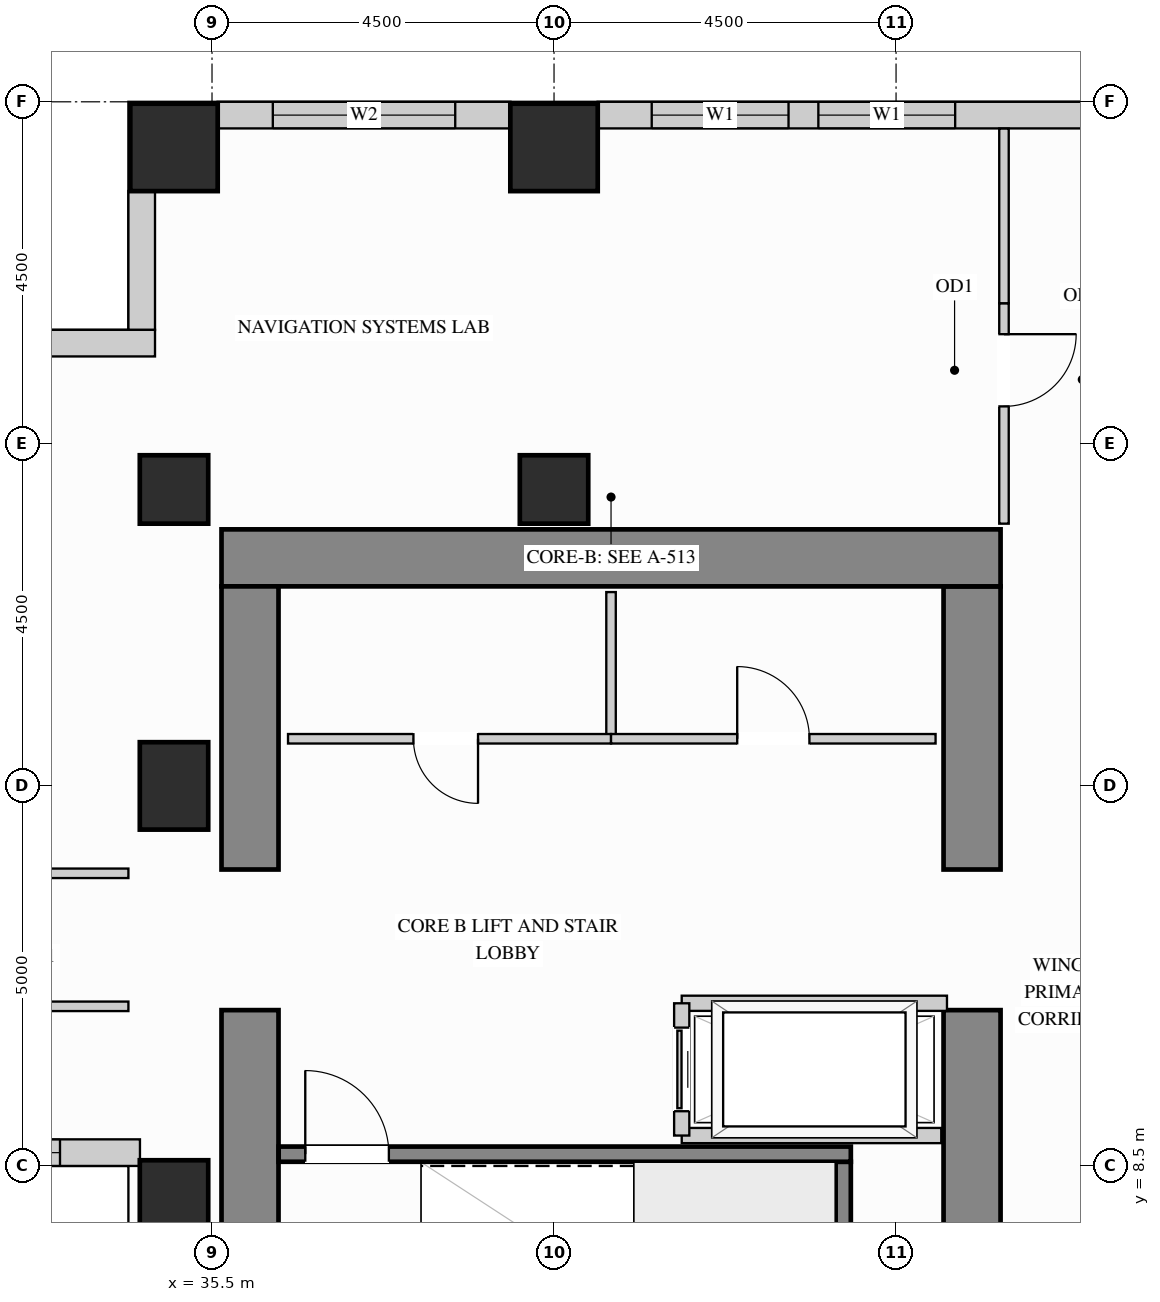
"""IFC4 building model, lengths in metres.
Left out: names, types, materials, properties, quantities, classifications, styles, units other than length and angle.
Written with IfcOpenShell. Run it as: python <this file> out.ifc"""

import sys

from ifc_helpers import new_model, si_unit, direction, frame, frame_2d, origin, origin_2d, place, context, subcontext, project, spatial, rectangle, extrude, source, transform, mapped, element, fill, save


model = new_model("IFC4")
c1 = context("Model", 3, precision=1e-05, world=origin(), true_north=direction((0.0, 1.0)))
c2 = subcontext(c1, "Body", "Model", "MODEL_VIEW")
j1 = project(units=[si_unit("LENGTHUNIT", "METRE"), si_unit("PLANEANGLEUNIT", "RADIAN")], contexts=[c1])
p1 = place(None, origin())
s1 = spatial("IfcSite", under=j1, at=p1, CompositionType="ELEMENT")
p2 = place(p1, origin())
s2 = spatial("IfcBuilding", under=s1, at=p2, CompositionType="ELEMENT")
p3 = place(p2, frame((0.0, 0.0, 127.8)))
s3 = spatial("IfcBuildingStorey", under=s2, at=p3, CompositionType="ELEMENT", Elevation=127.8)
m1 = source(origin(), c2, "Body", "SweptSolid", [
    extrude(rectangle(XDim=0.9, YDim=0.9, at=origin_2d()), origin(), (0.0, 0.0, 1.0), 3.38),
])
for number, where, z_axis, x_axis in (
    (1, (35.0, 17.4, 0.0), (0.0, 0.0, 1.0), (1.0, 0.0, 0.0)),
    (2, (40.0, 17.4, 0.0), (0.0, 0.0, 1.0), (1.0, 0.0, 0.0)),
):
    element("IfcColumn", number, at=place(p3, frame(where, z_axis=z_axis, x_axis=x_axis)), inside=s3, PredefinedType="COLUMN", context=c2, shape_type="MappedRepresentation", body=[
        mapped(m1, transform((0.0, 0.0, 0.0), x_axis=(1.0, 0.0, 0.0), y_axis=(0.0, 1.0, 0.0), z_axis=(0.0, 0.0, 1.0))),
    ])
m2 = source(origin(), c2, "Body", "SweptSolid", [
    extrude(rectangle(XDim=0.9, YDim=1.15, at=origin_2d()), origin(), (0.0, 0.0, 1.0), 3.38),
])
for number, where, z_axis, x_axis in (
    (3, (35.0, 13.5, 0.0), (0.0, 0.0, 1.0), (1.0, 0.0, 0.0)),
    (4, (35.0, 8.0, 0.0), (0.0, 0.0, 1.0), (1.0, 0.0, 0.0)),
):
    element("IfcColumn", number, at=place(p3, frame(where, z_axis=z_axis, x_axis=x_axis)), inside=s3, PredefinedType="COLUMN", context=c2, shape_type="MappedRepresentation", body=[
        mapped(m2, transform((0.0, 0.0, 0.0), x_axis=(1.0, 0.0, 0.0), y_axis=(0.0, 1.0, 0.0), z_axis=(0.0, 0.0, 1.0))),
    ])
m3 = source(origin(), c2, "Body", "SweptSolid", [
    extrude(rectangle(XDim=1.15, YDim=1.15, at=origin_2d()), origin(), (0.0, 0.0, 1.0), 3.38),
])
for number, where, z_axis, x_axis in (
    (5, (35.0, 21.9, 0.0), (0.0, 0.0, 1.0), (1.0, 0.0, 0.0)),
    (6, (40.0, 21.9, 0.0), (0.0, 0.0, 1.0), (1.0, 0.0, 0.0)),
):
    element("IfcColumn", number, at=place(p3, frame(where, z_axis=z_axis, x_axis=x_axis)), inside=s3, PredefinedType="COLUMN", context=c2, shape_type="MappedRepresentation", body=[
        mapped(m3, transform((0.0, 0.0, 0.0), x_axis=(1.0, 0.0, 0.0), y_axis=(0.0, 1.0, 0.0), z_axis=(0.0, 0.0, 1.0))),
    ])
m4 = source(origin(), c2, "Body", "SweptSolid", [
    extrude(rectangle(XDim=5.675, YDim=0.75, at=frame_2d((2.837, 0.0))), origin(), (0.0, 0.0, 1.0), 3.38),
])
p4 = place(p3, frame((45.5, 4.875, 0.0), z_axis=(0.0, 0.0, 1.0), x_axis=(0.0, 1.0, 0.0)))
e7 = element("IfcWall", 7, at=p4, inside=s3, PredefinedType="SHEAR", context=c2, shape_type="MappedRepresentation", body=[
    mapped(m4, transform((0.0, 0.0, 0.0), x_axis=(1.0, 0.0, 0.0), y_axis=(0.0, 1.0, 0.0), z_axis=(0.0, 0.0, 1.0))),
])
m5 = source(origin(), c2, "Body", "SweptSolid", [
    extrude(rectangle(XDim=3.725, YDim=0.75, at=frame_2d((1.863, 0.0))), origin(), (0.0, 0.0, 1.0), 3.38),
])
p5 = place(p3, frame((45.5, 12.4, 0.0), z_axis=(0.0, 0.0, 1.0), x_axis=(0.0, 1.0, 0.0)))
e8 = element("IfcWall", 8, at=p5, inside=s3, PredefinedType="SHEAR", context=c2, shape_type="MappedRepresentation", body=[
    mapped(m5, transform((0.0, 0.0, 0.0), x_axis=(1.0, 0.0, 0.0), y_axis=(0.0, 1.0, 0.0), z_axis=(0.0, 0.0, 1.0))),
])
m6 = source(origin(), c2, "Body", "SweptSolid", [
    extrude(rectangle(XDim=10.25, YDim=0.75, at=frame_2d((5.125, 0.0))), origin(), (0.0, 0.0, 1.0), 3.38),
])
p6 = place(p3, frame((35.625, 16.5, 0.0), z_axis=(0.0, 0.0, 1.0), x_axis=(1.0, 0.0, 0.0)))
e9 = element("IfcWall", 9, at=p6, inside=s3, PredefinedType="SHEAR", context=c2, shape_type="MappedRepresentation", body=[
    mapped(m6, transform((0.0, 0.0, 0.0), x_axis=(1.0, 0.0, 0.0), y_axis=(0.0, 1.0, 0.0), z_axis=(0.0, 0.0, 1.0))),
])
p7 = place(p3, frame((36.0, 4.875, 0.0), z_axis=(0.0, 0.0, 1.0), x_axis=(0.0, 1.0, 0.0)))
e10 = element("IfcWall", 10, at=p7, inside=s3, PredefinedType="SHEAR", context=c2, shape_type="MappedRepresentation", body=[
    mapped(m4, transform((0.0, 0.0, 0.0), x_axis=(1.0, 0.0, 0.0), y_axis=(0.0, 1.0, 0.0), z_axis=(0.0, 0.0, 1.0))),
])
p8 = place(p3, frame((36.0, 12.4, 0.0), z_axis=(0.0, 0.0, 1.0), x_axis=(0.0, 1.0, 0.0)))
e11 = element("IfcWall", 11, at=p8, inside=s3, PredefinedType="SHEAR", context=c2, shape_type="MappedRepresentation", body=[
    mapped(m5, transform((0.0, 0.0, 0.0), x_axis=(1.0, 0.0, 0.0), y_axis=(0.0, 1.0, 0.0), z_axis=(0.0, 0.0, 1.0))),
])
p9 = place(p3, frame((30.948, 8.675, 0.0), z_axis=(0.0, 0.0, 1.0), x_axis=(1.0, 0.0, 0.0)))
e12 = element("IfcWall", 12, at=p9, inside=s3, PredefinedType="SOLIDWALL", context=c2, shape_type="SweptSolid", body=[
    extrude(rectangle(XDim=3.604, YDim=0.35, at=frame_2d((1.802, 0.0))), origin(), (0.0, 0.0, 1.0), 3.365),
])
p10 = place(p9, frame((1.052, 0.0, 0.78)))
e13 = element("IfcOpeningElement", 13, at=p10, cuts=e12, PredefinedType="OPENING", context=c2, shape_type="SweptSolid", body=[
    extrude(rectangle(XDim=1.5, YDim=2.0, at=frame_2d((0.75, 1.0))), frame((0.0, 0.185, 0.0), z_axis=(0.0, -1.0, 0.0), x_axis=(1.0, 0.0, 0.0)), (0.0, 0.0, 1.0), 0.37),
])
p11 = place(p3, frame((47.027, 22.325, 0.0), z_axis=(0.0, 0.0, 1.0), x_axis=(-1.0, 0.0, 0.0)))
e14 = element("IfcWall", 14, at=p11, inside=s3, PredefinedType="SOLIDWALL", context=c2, shape_type="SweptSolid", body=[
    extrude(rectangle(XDim=6.454, YDim=0.35, at=frame_2d((3.227, 0.0))), origin(), (0.0, 0.0, 1.0), 3.365),
])
p12 = place(p11, frame((1.749, 0.0, 0.78)))
e15 = element("IfcOpeningElement", 15, at=p12, cuts=e14, PredefinedType="OPENING", context=c2, shape_type="SweptSolid", body=[
    extrude(rectangle(XDim=1.8, YDim=2.1, at=frame_2d((0.9, 1.05))), frame((0.0, 0.185, 0.0), z_axis=(0.0, -1.0, 0.0), x_axis=(1.0, 0.0, 0.0)), (0.0, 0.0, 1.0), 0.37),
])
p13 = place(p11, frame((3.942, 0.0, 0.78)))
e16 = element("IfcOpeningElement", 16, at=p13, cuts=e14, PredefinedType="OPENING", context=c2, shape_type="SweptSolid", body=[
    extrude(rectangle(XDim=1.8, YDim=2.1, at=frame_2d((0.9, 1.05))), frame((0.0, 0.185, 0.0), z_axis=(0.0, -1.0, 0.0), x_axis=(1.0, 0.0, 0.0)), (0.0, 0.0, 1.0), 0.37),
])
p14 = place(p3, frame((39.427, 22.325, 0.0), z_axis=(0.0, 0.0, 1.0), x_axis=(-1.0, 0.0, 0.0)))
e17 = element("IfcWall", 17, at=p14, inside=s3, PredefinedType="SOLIDWALL", context=c2, shape_type="SweptSolid", body=[
    extrude(rectangle(XDim=3.854, YDim=0.35, at=frame_2d((1.927, 0.0))), origin(), (0.0, 0.0, 1.0), 3.365),
])
p15 = place(p14, frame((0.727, 0.0, 0.78)))
e18 = element("IfcOpeningElement", 18, at=p15, cuts=e17, PredefinedType="OPENING", context=c2, shape_type="SweptSolid", body=[
    extrude(rectangle(XDim=2.4, YDim=2.1, at=frame_2d((1.2, 1.05))), frame((0.0, 0.185, 0.0), z_axis=(0.0, -1.0, 0.0), x_axis=(1.0, 0.0, 0.0)), (0.0, 0.0, 1.0), 0.37),
])
m7 = source(origin(), c2, "Body", "SweptSolid", [
    extrude(rectangle(XDim=1.829, YDim=0.35, at=frame_2d((0.915, 0.0))), origin(), (0.0, 0.0, 1.0), 3.365),
])
p16 = place(p3, frame((34.575, 21.327, 0.0), z_axis=(0.0, 0.0, 1.0), x_axis=(0.0, -1.0, 0.0)))
e19 = element("IfcWall", 19, at=p16, inside=s3, PredefinedType="SOLIDWALL", context=c2, shape_type="MappedRepresentation", body=[
    mapped(m7, transform((0.0, 0.0, 0.0), x_axis=(1.0, 0.0, 0.0), y_axis=(0.0, 1.0, 0.0), z_axis=(0.0, 0.0, 1.0))),
])
p17 = place(p3, frame((34.75, 19.325, 0.0), z_axis=(0.0, 0.0, 1.0), x_axis=(-1.0, 0.0, 0.0)))
e20 = element("IfcWall", 20, at=p17, inside=s3, PredefinedType="SOLIDWALL", context=c2, shape_type="SweptSolid", body=[
    extrude(rectangle(XDim=15.6, YDim=0.35, at=frame_2d((7.8, 0.0))), origin(), (0.0, 0.0, 1.0), 3.365),
])
p18 = place(p17, frame((4.307, 0.0, 0.78)))
e21 = element("IfcOpeningElement", 21, at=p18, cuts=e20, PredefinedType="OPENING", context=c2, shape_type="SweptSolid", body=[
    extrude(rectangle(XDim=1.5, YDim=2.0, at=frame_2d((0.75, 1.0))), frame((0.0, 0.185, 0.0), z_axis=(0.0, -1.0, 0.0), x_axis=(1.0, 0.0, 0.0)), (0.0, 0.0, 1.0), 0.37),
])
p19 = place(p17, frame((9.793, 0.0, 0.78)))
e22 = element("IfcOpeningElement", 22, at=p19, cuts=e20, PredefinedType="OPENING", context=c2, shape_type="SweptSolid", body=[
    extrude(rectangle(XDim=1.5, YDim=2.0, at=frame_2d((0.75, 1.0))), frame((0.0, 0.185, 0.0), z_axis=(0.0, -1.0, 0.0), x_axis=(1.0, 0.0, 0.0)), (0.0, 0.0, 1.0), 0.37),
])
m8 = source(origin(), c2, "Body", "SweptSolid", [
    extrude(rectangle(XDim=1.93, YDim=0.125, at=frame_2d((0.965, 0.0))), origin(), (0.0, 0.0, 1.0), 3.365),
])
p20 = place(p3, frame((40.75, 14.12, 0.0), z_axis=(0.0, 0.0, 1.0), x_axis=(0.0, 1.0, 0.0)))
e23 = element("IfcWall", 23, at=p20, inside=s3, PredefinedType="PARTITIONING", context=c2, shape_type="MappedRepresentation", body=[
    mapped(m8, transform((0.0, 0.0, 0.0), x_axis=(1.0, 0.0, 0.0), y_axis=(0.0, 1.0, 0.0), z_axis=(0.0, 0.0, 1.0))),
])
p21 = place(p3, frame((36.5, 14.12, 0.0), z_axis=(0.0, 0.0, 1.0), x_axis=(1.0, 0.0, 0.0)))
e24 = element("IfcWall", 24, at=p21, inside=s3, PredefinedType="PARTITIONING", context=c2, shape_type="SweptSolid", body=[
    extrude(rectangle(XDim=4.25, YDim=0.125, at=frame_2d((2.125, 0.0))), origin(), (0.0, 0.0, 1.0), 3.365),
])
p22 = place(p21, frame((1.65, 0.0, 0.0)))
e25 = element("IfcOpeningElement", 25, at=p22, cuts=e24, PredefinedType="OPENING", context=c2, shape_type="SweptSolid", body=[
    extrude(rectangle(XDim=0.85, YDim=2.1, at=frame_2d((0.425, 1.05))), frame((0.0, 0.073, 0.0), z_axis=(0.0, -1.0, 0.0), x_axis=(1.0, 0.0, 0.0)), (0.0, 0.0, 1.0), 0.145),
])
p23 = place(p3, frame((40.75, 14.12, 0.0), z_axis=(0.0, 0.0, 1.0), x_axis=(1.0, 0.0, 0.0)))
e26 = element("IfcWall", 26, at=p23, inside=s3, PredefinedType="PARTITIONING", context=c2, shape_type="SweptSolid", body=[
    extrude(rectangle(XDim=4.27, YDim=0.125, at=frame_2d((2.135, 0.0))), origin(), (0.0, 0.0, 1.0), 3.365),
])
p24 = place(p23, frame((1.66, 0.0, 0.0)))
e27 = element("IfcOpeningElement", 27, at=p24, cuts=e26, PredefinedType="OPENING", context=c2, shape_type="SweptSolid", body=[
    extrude(rectangle(XDim=0.95, YDim=2.15, at=frame_2d((0.475, 1.075))), frame((0.0, 0.073, 0.0), z_axis=(0.0, -1.0, 0.0), x_axis=(1.0, 0.0, 0.0)), (0.0, 0.0, 1.0), 0.145),
])
p25 = place(p3, frame((45.92, 16.95, 0.0), z_axis=(0.0, 0.0, 1.0), x_axis=(0.0, 1.0, 0.0)))
e28 = element("IfcWall", 28, at=p25, inside=s3, PredefinedType="PARTITIONING", context=c2, shape_type="SweptSolid", body=[
    extrude(rectangle(XDim=2.9, YDim=0.125, at=frame_2d((1.45, 0.0))), origin(), (0.0, 0.0, 1.0), 3.365),
])
p26 = place(p25, frame((1.543, 0.0, 0.0)))
e29 = element("IfcOpeningElement", 29, at=p26, cuts=e28, PredefinedType="OPENING", context=c2, shape_type="SweptSolid", body=[
    extrude(rectangle(XDim=0.95, YDim=2.15, at=frame_2d((0.475, 1.075))), frame((0.0, 0.073, 0.0), z_axis=(0.0, -1.0, 0.0), x_axis=(1.0, 0.0, 0.0)), (0.0, 0.0, 1.0), 0.145),
])
m9 = source(origin(), c2, "Body", "SweptSolid", [
    extrude(rectangle(XDim=2.298, YDim=0.125, at=frame_2d((1.149, 0.0))), origin(), (0.0, 0.0, 1.0), 3.365),
])
p27 = place(p3, frame((45.92, 19.85, 0.0), z_axis=(0.0, 0.0, 1.0), x_axis=(0.0, 1.0, 0.0)))
e30 = element("IfcWall", 30, at=p27, inside=s3, PredefinedType="PARTITIONING", context=c2, shape_type="MappedRepresentation", body=[
    mapped(m9, transform((0.0, 0.0, 0.0), x_axis=(1.0, 0.0, 0.0), y_axis=(0.0, 1.0, 0.0), z_axis=(0.0, 0.0, 1.0))),
])
p28 = place(p3, frame((29.85, 12.35, 0.0), z_axis=(0.0, 0.0, 1.0), x_axis=(1.0, 0.0, 0.0)))
e31 = element("IfcWall", 31, at=p28, inside=s3, PredefinedType="PARTITIONING", context=c2, shape_type="SweptSolid", body=[
    extrude(rectangle(XDim=4.55, YDim=0.125, at=frame_2d((2.275, 0.0))), origin(), (0.0, 0.0, 1.0), 3.365),
])
p29 = place(p28, frame((1.8, 0.0, 0.0)))
e32 = element("IfcOpeningElement", 32, at=p29, cuts=e31, PredefinedType="OPENING", context=c2, shape_type="SweptSolid", body=[
    extrude(rectangle(XDim=0.95, YDim=2.15, at=frame_2d((0.475, 1.075))), frame((0.0, 0.073, 0.0), z_axis=(0.0, -1.0, 0.0), x_axis=(1.0, 0.0, 0.0)), (0.0, 0.0, 1.0), 0.145),
])
p30 = place(p3, frame((26.95, 10.6, 0.0), z_axis=(0.0, 0.0, 1.0), x_axis=(1.0, 0.0, 0.0)))
e33 = element("IfcWall", 33, at=p30, inside=s3, PredefinedType="PARTITIONING", context=c2, shape_type="SweptSolid", body=[
    extrude(rectangle(XDim=7.45, YDim=0.125, at=frame_2d((3.725, 0.0))), origin(), (0.0, 0.0, 1.0), 3.365),
])
p31 = place(p30, frame((4.683, 0.0, 0.0)))
e34 = element("IfcOpeningElement", 34, at=p31, cuts=e33, PredefinedType="OPENING", context=c2, shape_type="SweptSolid", body=[
    extrude(rectangle(XDim=0.95, YDim=2.15, at=frame_2d((0.475, 1.075))), frame((0.0, 0.073, 0.0), z_axis=(0.0, -1.0, 0.0), x_axis=(1.0, 0.0, 0.0)), (0.0, 0.0, 1.0), 0.145),
])
m10 = source(origin(), c2, "Body", "SweptSolid", [
    extrude(rectangle(XDim=3.49, YDim=0.2, at=frame_2d((1.745, 0.0))), origin(), (0.0, 0.0, 1.0), 3.365),
])
p32 = place(p3, frame((41.68, 10.64, 0.0), z_axis=(0.0, 0.0, 1.0), x_axis=(1.0, 0.0, 0.0)))
e35 = element("IfcWall", 35, at=p32, inside=s3, PredefinedType="PARTITIONING", context=c2, shape_type="MappedRepresentation", body=[
    mapped(m10, transform((0.0, 0.0, 0.0), x_axis=(1.0, 0.0, 0.0), y_axis=(0.0, 1.0, 0.0), z_axis=(0.0, 0.0, 1.0))),
])
m11 = source(origin(), c2, "Body", "SweptSolid", [
    extrude(rectangle(XDim=3.415, YDim=0.2, at=frame_2d((1.708, 0.0))), origin(), (0.0, 0.0, 1.0), 3.365),
])
p33 = place(p3, frame((41.68, 8.9, 0.0), z_axis=(0.0, 0.0, 1.0), x_axis=(1.0, 0.0, 0.0)))
e36 = element("IfcWall", 36, at=p33, inside=s3, PredefinedType="PARTITIONING", context=c2, shape_type="MappedRepresentation", body=[
    mapped(m11, transform((0.0, 0.0, 0.0), x_axis=(1.0, 0.0, 0.0), y_axis=(0.0, 1.0, 0.0), z_axis=(0.0, 0.0, 1.0))),
])
p34 = place(p3, frame((41.68, 8.9, 0.0), z_axis=(0.0, 0.0, 1.0), x_axis=(0.0, 1.0, 0.0)))
e37 = element("IfcWall", 37, at=p34, inside=s3, PredefinedType="PARTITIONING", context=c2, shape_type="SweptSolid", body=[
    extrude(rectangle(XDim=1.74, YDim=0.2, at=frame_2d((0.87, 0.0))), origin(), (0.0, 0.0, 1.0), 3.365),
])
p35 = place(p34, frame((0.32, 0.0, 0.0)))
e38 = element("IfcOpeningElement", 38, at=p35, cuts=e37, PredefinedType="OPENING", context=c2, shape_type="SweptSolid", body=[
    extrude(rectangle(XDim=1.1, YDim=2.2, at=frame_2d((0.55, 1.1))), frame((0.0, 0.11, 0.0), z_axis=(0.0, -1.0, 0.0), x_axis=(1.0, 0.0, 0.0)), (0.0, 0.0, 1.0), 0.22),
])
m12 = source(origin(), c2, "Body", "SweptSolid", [
    extrude(rectangle(XDim=3.678, YDim=0.2, at=frame_2d((1.839, 0.0))), origin(), (0.0, 0.0, 1.0), 3.38),
])
p36 = place(p3, frame((43.805, 4.877, 0.0), z_axis=(0.0, 0.0, 1.0), x_axis=(0.0, 1.0, 0.0)))
e39 = element("IfcWall", 39, at=p36, inside=s3, PredefinedType="SHEAR", context=c2, shape_type="MappedRepresentation", body=[
    mapped(m12, transform((0.0, 0.0, 0.0), x_axis=(1.0, 0.0, 0.0), y_axis=(0.0, 1.0, 0.0), z_axis=(0.0, 0.0, 1.0))),
])
p37 = place(p3, frame((36.377, 8.655, 0.0), z_axis=(0.0, 0.0, 1.0), x_axis=(1.0, 0.0, 0.0)))
e40 = element("IfcWall", 40, at=p37, inside=s3, PredefinedType="SHEAR", context=c2, shape_type="SweptSolid", body=[
    extrude(rectangle(XDim=7.528, YDim=0.2, at=frame_2d((3.764, 0.0))), origin(), (0.0, 0.0, 1.0), 3.38),
])
p38 = place(p37, frame((0.35, 0.0, 0.0)))
e41 = element("IfcOpeningElement", 41, at=p38, cuts=e40, PredefinedType="OPENING", context=c2, shape_type="SweptSolid", body=[
    extrude(rectangle(XDim=1.1, YDim=2.15, at=frame_2d((0.55, 1.075))), frame((0.0, 0.11, 0.0), z_axis=(0.0, -1.0, 0.0), x_axis=(1.0, 0.0, 0.0)), (0.0, 0.0, 1.0), 0.22),
])
m13 = source(origin(), c2, "Body", "SweptSolid", [
    extrude(rectangle(XDim=1.1, YDim=2.2, at=frame_2d((0.55, 1.1))), frame((0.0, 0.025, 0.0), z_axis=(0.0, -1.0, 0.0), x_axis=(1.0, 0.0, 0.0)), (0.0, 0.0, 1.0), 0.05),
])
p39 = place(p35, origin())
e42 = element("IfcDoor", 42, at=p39, inside=s3, OperationType="SLIDING_TO_LEFT", PredefinedType="DOOR", context=c2, shape_type="MappedRepresentation", body=[
    mapped(m13, transform((0.0, 0.0, 0.0), x_axis=(1.0, 0.0, 0.0), y_axis=(0.0, 1.0, 0.0), z_axis=(0.0, 0.0, 1.0))),
])
fill(e38, e42)
m14 = source(origin(), c2, "Body", "SweptSolid", [
    extrude(rectangle(XDim=0.95, YDim=2.15, at=frame_2d((0.475, 1.075))), frame((0.0, 0.025, 0.0), z_axis=(0.0, -1.0, 0.0), x_axis=(1.0, 0.0, 0.0)), (0.0, 0.0, 1.0), 0.05),
])
p40 = place(p24, origin())
e43 = element("IfcDoor", 43, at=p40, inside=s3, OperationType="SINGLE_SWING_LEFT", PredefinedType="DOOR", context=c2, shape_type="MappedRepresentation", body=[
    mapped(m14, transform((0.0, 0.0, 0.0), x_axis=(1.0, 0.0, 0.0), y_axis=(0.0, 1.0, 0.0), z_axis=(0.0, 0.0, 1.0))),
])
fill(e27, e43)
p41 = place(p26, origin())
e44 = element("IfcDoor", 44, at=p41, inside=s3, OperationType="SINGLE_SWING_RIGHT", PredefinedType="DOOR", context=c2, shape_type="MappedRepresentation", body=[
    mapped(m14, transform((0.0, 0.0, 0.0), x_axis=(1.0, 0.0, 0.0), y_axis=(0.0, 1.0, 0.0), z_axis=(0.0, 0.0, 1.0))),
])
fill(e29, e44)
m15 = source(origin(), c2, "Body", "SweptSolid", [
    extrude(rectangle(XDim=0.85, YDim=2.1, at=frame_2d((0.425, 1.05))), frame((0.0, 0.025, 0.0), z_axis=(0.0, -1.0, 0.0), x_axis=(1.0, 0.0, 0.0)), (0.0, 0.0, 1.0), 0.05),
])
p42 = place(p22, origin())
e45 = element("IfcDoor", 45, at=p42, inside=s3, OperationType="SINGLE_SWING_RIGHT", PredefinedType="DOOR", context=c2, shape_type="MappedRepresentation", body=[
    mapped(m15, transform((0.0, 0.0, 0.0), x_axis=(1.0, 0.0, 0.0), y_axis=(0.0, 1.0, 0.0), z_axis=(0.0, 0.0, 1.0))),
])
fill(e25, e45)
m16 = source(origin(), c2, "Body", "SweptSolid", [
    extrude(rectangle(XDim=1.1, YDim=2.15, at=frame_2d((0.55, 1.075))), frame((0.0, 0.025, 0.0), z_axis=(0.0, -1.0, 0.0), x_axis=(1.0, 0.0, 0.0)), (0.0, 0.0, 1.0), 0.05),
])
p43 = place(p38, origin())
e46 = element("IfcDoor", 46, at=p43, inside=s3, OperationType="SINGLE_SWING_LEFT", PredefinedType="DOOR", context=c2, shape_type="MappedRepresentation", body=[
    mapped(m16, transform((0.0, 0.0, 0.0), x_axis=(1.0, 0.0, 0.0), y_axis=(0.0, 1.0, 0.0), z_axis=(0.0, 0.0, 1.0))),
])
fill(e41, e46)
m17 = source(origin(), c2, "Body", "SweptSolid", [
    extrude(rectangle(XDim=1.8, YDim=2.1, at=frame_2d((0.9, 1.05))), frame((0.0, 0.03, 0.0), z_axis=(0.0, -1.0, 0.0), x_axis=(1.0, 0.0, 0.0)), (0.0, 0.0, 1.0), 0.06),
])
p44 = place(p12, origin())
e47 = element("IfcWindow", 47, at=p44, inside=s3, PartitioningType="SINGLE_PANEL", PredefinedType="WINDOW", context=c2, shape_type="MappedRepresentation", body=[
    mapped(m17, transform((0.0, 0.0, 0.0), x_axis=(1.0, 0.0, 0.0), y_axis=(0.0, 1.0, 0.0), z_axis=(0.0, 0.0, 1.0))),
])
fill(e15, e47)
p45 = place(p13, origin())
e48 = element("IfcWindow", 48, at=p45, inside=s3, PartitioningType="SINGLE_PANEL", PredefinedType="WINDOW", context=c2, shape_type="MappedRepresentation", body=[
    mapped(m17, transform((0.0, 0.0, 0.0), x_axis=(1.0, 0.0, 0.0), y_axis=(0.0, 1.0, 0.0), z_axis=(0.0, 0.0, 1.0))),
])
fill(e16, e48)
m18 = source(origin(), c2, "Body", "SweptSolid", [
    extrude(rectangle(XDim=2.4, YDim=2.1, at=frame_2d((1.2, 1.05))), frame((0.0, 0.03, 0.0), z_axis=(0.0, -1.0, 0.0), x_axis=(1.0, 0.0, 0.0)), (0.0, 0.0, 1.0), 0.06),
])
p46 = place(p15, origin())
e49 = element("IfcWindow", 49, at=p46, inside=s3, PartitioningType="SINGLE_PANEL", PredefinedType="WINDOW", context=c2, shape_type="MappedRepresentation", body=[
    mapped(m18, transform((0.0, 0.0, 0.0), x_axis=(1.0, 0.0, 0.0), y_axis=(0.0, 1.0, 0.0), z_axis=(0.0, 0.0, 1.0))),
])
fill(e18, e49)
m19 = source(origin(), c2, "Body", "SweptSolid", [
    extrude(rectangle(XDim=1.5, YDim=2.0, at=frame_2d((0.75, 1.0))), frame((0.0, 0.03, 0.0), z_axis=(0.0, -1.0, 0.0), x_axis=(1.0, 0.0, 0.0)), (0.0, 0.0, 1.0), 0.06),
])
p47 = place(p10, origin())
e50 = element("IfcWindow", 50, at=p47, inside=s3, PartitioningType="SINGLE_PANEL", PredefinedType="WINDOW", context=c2, shape_type="MappedRepresentation", body=[
    mapped(m19, transform((0.0, 0.0, 0.0), x_axis=(1.0, 0.0, 0.0), y_axis=(0.0, 1.0, 0.0), z_axis=(0.0, 0.0, 1.0))),
])
fill(e13, e50)
save(model, sys.argv[1])
